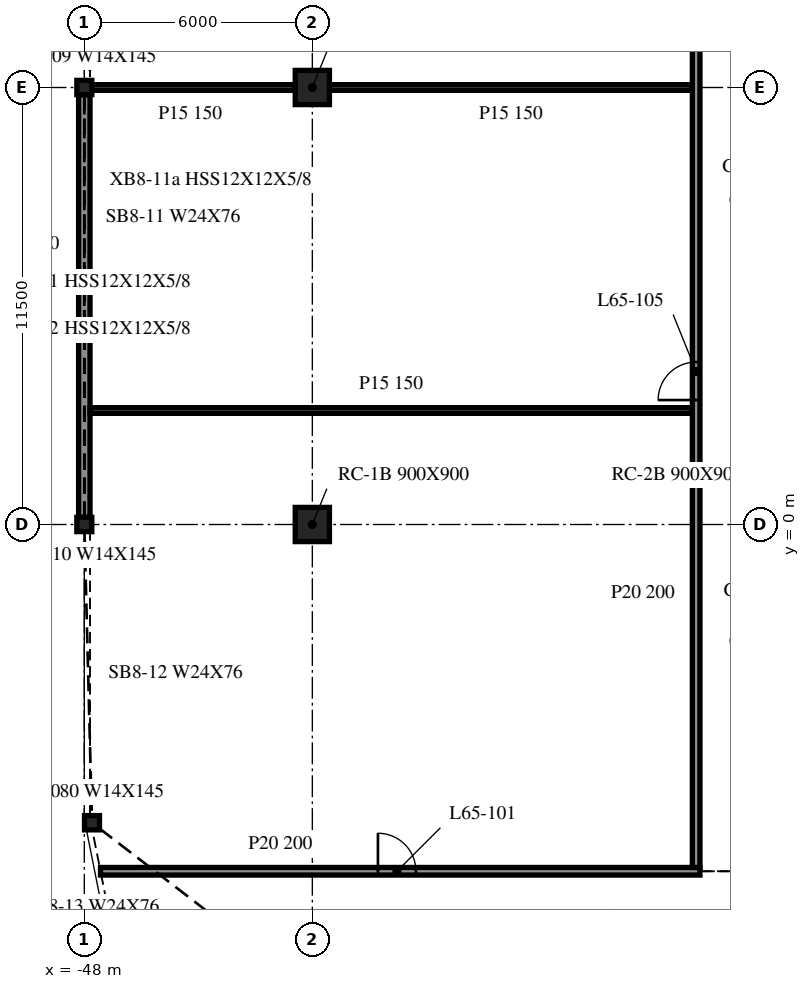
"""IFC4 building model, lengths in metres.
Left out: names, types, materials, properties, quantities, classifications, styles, units other than length and angle.
Written with IfcOpenShell. Run it as: python <this file> out.ifc"""

import sys

from ifc_helpers import new_model, si_unit, direction, frame, frame_2d, origin, origin_2d, place, context, subcontext, project, spatial, rectangle, i_section, extrude, element, fill, save


model = new_model("IFC4")
c1 = context("Model", 3, precision=1e-05, world=origin(), true_north=direction((0.0, 1.0)))
c2 = subcontext(c1, "Body", "Model", "MODEL_VIEW")
j1 = project(units=[si_unit("LENGTHUNIT", "METRE"), si_unit("PLANEANGLEUNIT", "RADIAN")], contexts=[c1])
p1 = place(None, origin())
s1 = spatial("IfcSite", under=j1, at=p1, CompositionType="ELEMENT")
p2 = place(p1, origin())
s2 = spatial("IfcBuilding", under=s1, at=p2, CompositionType="ELEMENT")
p3 = place(p2, frame((0.0, 0.0, 267.1)))
s3 = spatial("IfcBuildingStorey", under=s2, at=p3, CompositionType="ELEMENT", Elevation=267.1)
for number, where, z_axis, x_axis in (
    (1, (-42.0, 0.0, -0.34), (0.0, 0.0, 1.0), (1.0, 0.0, 0.0)),
    (2, (-42.0, 11.5, -0.34), (0.0, 0.0, 1.0), (1.0, 0.0, 0.0)),
):
    element("IfcColumn", number, at=place(p3, frame(where, z_axis=z_axis, x_axis=x_axis)), inside=s3, PredefinedType="COLUMN", context=c2, shape_type="SweptSolid", body=[
        extrude(rectangle(XDim=0.9, YDim=0.9, at=origin_2d()), origin(), (0.0, 0.0, 1.0), 3.8),
    ])
for number, where, z_axis, x_axis in (
    (3, (-48.0, 11.5, -0.34), (0.0, 0.0, 1.0), (1.0, 0.0, 0.0)),
    (4, (-48.0, 0.0, -0.34), (0.0, 0.0, 1.0), (1.0, 0.0, 0.0)),
    (5, (-47.798, -7.848, -0.34), (0.0, 0.0, 1.0), (1.0, 0.0, 0.0)),
):
    element("IfcColumn", number, at=place(p3, frame(where, z_axis=z_axis, x_axis=x_axis)), inside=s3, PredefinedType="COLUMN", context=c2, shape_type="SweptSolid", body=[
        extrude(i_section(OverallWidth=0.394, OverallDepth=0.376, WebThickness=0.017, FlangeThickness=0.028, at=origin_2d()), origin(), (0.0, 0.0, 1.0), 3.8),
    ])
p4 = place(p3, frame((-48.0, 11.312, 0.0), z_axis=(0.0, 0.0, 1.0), x_axis=(0.0, -1.0, 0.0)))
e6 = element("IfcWall", 6, at=p4, inside=s3, PredefinedType="NOTDEFINED", context=c2, shape_type="SweptSolid", body=[
    extrude(rectangle(XDim=11.124, YDim=0.3, at=frame_2d((5.562, 0.0))), origin(), (0.0, 0.0, 1.0), 2.853),
])
p5 = place(p3, frame((-47.574, -9.125, 0.0), z_axis=(0.0, 0.0, 1.0), x_axis=(1.0, 0.0, 0.0)))
e7 = element("IfcWall", 7, at=p5, inside=s3, PredefinedType="PARTITIONING", context=c2, shape_type="SweptSolid", body=[
    extrude(rectangle(XDim=15.774, YDim=0.2, at=frame_2d((7.887, 0.0))), origin(), (0.0, 0.0, 1.0), 3.46),
])
p6 = place(p5, frame((7.3, 0.0, 0.0)))
e8 = element("IfcOpeningElement", 8, at=p6, cuts=e7, PredefinedType="OPENING", context=c2, shape_type="SweptSolid", body=[
    extrude(rectangle(XDim=1.0, YDim=2.1, at=frame_2d((0.5, 1.05))), frame((0.0, 0.11, 0.0), z_axis=(0.0, -1.0, 0.0), x_axis=(1.0, 0.0, 0.0)), (0.0, 0.0, 1.0), 0.22),
])
p7 = place(p3, frame((-47.85, 3.0, 0.0), z_axis=(0.0, 0.0, 1.0), x_axis=(1.0, 0.0, 0.0)))
e9 = element("IfcWall", 9, at=p7, inside=s3, PredefinedType="PARTITIONING", context=c2, shape_type="SweptSolid", body=[
    extrude(rectangle(XDim=15.85, YDim=0.15, at=frame_2d((7.925, 0.0))), origin(), (0.0, 0.0, 1.0), 3.46),
])
p8 = place(p3, frame((-47.975, 11.5, 0.0), z_axis=(0.0, 0.0, 1.0), x_axis=(1.0, 0.0, 0.0)))
e10 = element("IfcWall", 10, at=p8, inside=s3, PredefinedType="PARTITIONING", context=c2, shape_type="SweptSolid", body=[
    extrude(rectangle(XDim=5.525, YDim=0.15, at=frame_2d((2.763, 0.0))), origin(), (0.0, 0.0, 1.0), 3.46),
])
p9 = place(p3, frame((-41.55, 11.5, 0.0), z_axis=(0.0, 0.0, 1.0), x_axis=(1.0, 0.0, 0.0)))
e11 = element("IfcWall", 11, at=p9, inside=s3, PredefinedType="PARTITIONING", context=c2, shape_type="SweptSolid", body=[
    extrude(rectangle(XDim=9.55, YDim=0.15, at=frame_2d((4.775, 0.0))), origin(), (0.0, 0.0, 1.0), 3.46),
])
p10 = place(p3, frame((-31.9, -9.025, 0.0), z_axis=(0.0, 0.0, 1.0), x_axis=(0.0, 1.0, 0.0)))
e12 = element("IfcWall", 12, at=p10, inside=s3, PredefinedType="PARTITIONING", context=c2, shape_type="SweptSolid", body=[
    extrude(rectangle(XDim=24.05, YDim=0.2, at=frame_2d((12.025, 0.0))), origin(), (0.0, 0.0, 1.0), 3.46),
])
p11 = place(p10, frame((12.3, 0.0, 0.0)))
e13 = element("IfcOpeningElement", 13, at=p11, cuts=e12, PredefinedType="OPENING", context=c2, shape_type="SweptSolid", body=[
    extrude(rectangle(XDim=1.0, YDim=2.1, at=frame_2d((0.5, 1.05))), frame((0.0, 0.11, 0.0), z_axis=(0.0, -1.0, 0.0), x_axis=(1.0, 0.0, 0.0)), (0.0, 0.0, 1.0), 0.22),
])
p12 = place(p6, origin())
e14 = element("IfcDoor", 14, at=p12, inside=s3, OperationType="SINGLE_SWING_LEFT", PredefinedType="DOOR", context=c2, shape_type="SweptSolid", body=[
    extrude(rectangle(XDim=1.0, YDim=2.1, at=frame_2d((0.5, 1.05))), frame((0.0, 0.025, 0.0), z_axis=(0.0, -1.0, 0.0), x_axis=(1.0, 0.0, 0.0)), (0.0, 0.0, 1.0), 0.05),
])
fill(e8, e14)
p13 = place(p11, origin())
e15 = element("IfcDoor", 15, at=p13, inside=s3, OperationType="SINGLE_SWING_RIGHT", PredefinedType="DOOR", context=c2, shape_type="SweptSolid", body=[
    extrude(rectangle(XDim=1.0, YDim=2.1, at=frame_2d((0.5, 1.05))), frame((0.0, 0.025, 0.0), z_axis=(0.0, -1.0, 0.0), x_axis=(1.0, 0.0, 0.0)), (0.0, 0.0, 1.0), 0.05),
])
fill(e13, e15)
save(model, sys.argv[1])
